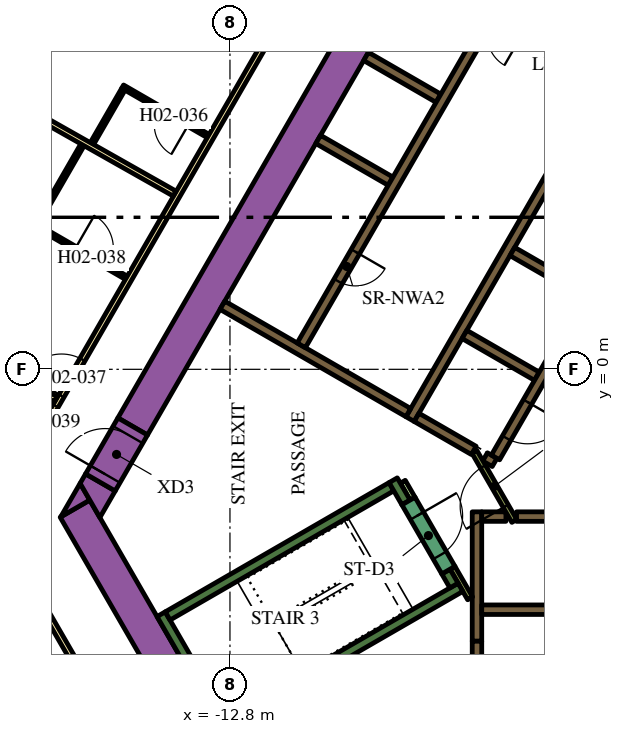
"""IFC4 building model, lengths in metres.
Left out: names, types, materials, properties, quantities, classifications, styles, units other than length and angle.
Written with IfcOpenShell. Run it as: python <this file> out.ifc"""

import sys

from ifc_helpers import new_model, si_unit, direction, frame, frame_2d, origin, place, context, subcontext, project, spatial, polyline, rectangle, outline, extrude, element, fill, save


model = new_model("IFC4")
c1 = context("Model", 3, precision=1e-05, world=origin(), true_north=direction((0.0, 1.0)))
c2 = subcontext(c1, "Body", "Model", "MODEL_VIEW")
j1 = project(units=[si_unit("LENGTHUNIT", "METRE"), si_unit("PLANEANGLEUNIT", "RADIAN")], contexts=[c1])
p1 = place(None, origin())
s1 = spatial("IfcSite", under=j1, at=p1, CompositionType="ELEMENT")
p2 = place(p1, origin())
s2 = spatial("IfcBuilding", under=s1, at=p2, CompositionType="ELEMENT")
p3 = place(p2, frame((0.0, 0.0, 47.1)))
s3 = spatial("IfcBuildingStorey", under=s2, at=p3, CompositionType="ELEMENT", Elevation=47.1)
p4 = place(p3, frame((-15.36, -1.503, 0.0), z_axis=(0.0, 0.0, 1.0), x_axis=(0.50000389221, 0.866023156604, 0.0)))
e1 = element("IfcWall", 1, at=p4, inside=s3, PredefinedType="SOLIDWALL", context=c2, shape_type="SweptSolid", body=[
    extrude(rectangle(XDim=21.0, YDim=0.9, at=frame_2d((10.5, 0.0))), origin(), (0.0, 0.0, 1.0), 3.9),
])
p5 = place(p3, frame((-12.134, -11.883, 0.0), z_axis=(0.0, 0.0, 1.0), x_axis=(-0.500005339912, 0.866022320763, 0.0)))
e2 = element("IfcWall", 2, at=p5, inside=s3, PredefinedType="SOLIDWALL", context=c2, shape_type="SweptSolid", body=[
    extrude(rectangle(XDim=9.488, YDim=0.9, at=frame_2d((4.744, 0.0))), origin(), (0.0, 0.0, 1.0), 3.9),
])
p6 = place(p3, origin())
e3 = element("IfcWall", 3, at=p6, inside=s3, PredefinedType="SOLIDWALL", context=c2, shape_type="SweptSolid", body=[
    extrude(outline(polyline([(-16.489, -3.44), (-17.251, -3.88), (-16.743, -3.0), (-16.489, -3.44)])), origin(), (0.0, 0.0, 1.0), 3.9),
])
e4 = element("IfcWall", 4, at=p6, inside=s3, PredefinedType="SOLIDWALL", context=c2, shape_type="SweptSolid", body=[
    extrude(outline(polyline([(-15.82, -3.201), (-16.223, -3.9), (-16.743, -3.0), (-16.599, -2.751), (-15.82, -3.201)])), origin(), (0.0, 0.0, 1.0), 3.9),
])
p7 = place(p3, frame((-12.885, -9.431, 0.0), z_axis=(0.0, 0.0, 1.0), x_axis=(-0.500020560727, 0.866013532718, 0.0)))
e5 = element("IfcWall", 5, at=p7, inside=s3, PredefinedType="SOLIDWALL", context=c2, shape_type="SweptSolid", body=[
    extrude(rectangle(XDim=3.45, YDim=0.25, at=frame_2d((1.725, 0.0))), origin(), (0.0, 0.0, 1.0), 3.9),
])
p8 = place(p3, frame((-14.44, -6.49, 0.0), z_axis=(0.0, 0.0, 1.0), x_axis=(0.866022966069, 0.500004222222, 0.0)))
e6 = element("IfcWall", 6, at=p8, inside=s3, PredefinedType="SOLIDWALL", context=c2, shape_type="SweptSolid", body=[
    extrude(rectangle(XDim=6.8, YDim=0.25, at=frame_2d((3.4, 0.0))), origin(), (0.0, 0.0, 1.0), 3.9),
])
p9 = place(p3, frame((-8.168, -3.503, 0.0), z_axis=(0.0, 0.0, 1.0), x_axis=(-0.499952099219, 0.866053057547, 0.0)))
e7 = element("IfcWall", 7, at=p9, inside=s3, PredefinedType="SOLIDWALL", context=c2, shape_type="SweptSolid", body=[
    extrude(rectangle(XDim=0.675, YDim=0.25, at=frame_2d((0.337, 0.0))), origin(), (0.0, 0.0, 1.0), 3.9),
])
p10 = place(p3, frame((-12.84, -9.261, 0.0), z_axis=(0.0, 0.0, 1.0), x_axis=(0.866016039709, 0.500016218704, 0.0)))
e8 = element("IfcWall", 8, at=p10, inside=s3, PredefinedType="SOLIDWALL", context=c2, shape_type="SweptSolid", body=[
    extrude(rectangle(XDim=7.05, YDim=0.25, at=frame_2d((3.525, 0.0))), origin(), (0.0, 0.0, 1.0), 3.9),
])
p11 = place(p3, frame((-6.905, -5.69, 0.0), z_axis=(0.0, 0.0, 1.0), x_axis=(-0.500402024738, 0.865793170242, 0.0)))
e9 = element("IfcWall", 9, at=p11, inside=s3, PredefinedType="SOLIDWALL", context=c2, shape_type="SweptSolid", body=[
    extrude(rectangle(XDim=0.425, YDim=0.25, at=frame_2d((0.212, 0.0))), origin(), (0.0, 0.0, 1.0), 3.9),
])
p12 = place(p3, frame((-5.259, -3.875, 0.0), z_axis=(0.0, 0.0, 1.0), x_axis=(1.0, 0.0, 0.0)))
e10 = element("IfcWall", 10, at=p12, inside=s3, PredefinedType="SOLIDWALL", context=c2, shape_type="SweptSolid", body=[
    extrude(rectangle(XDim=10.489, YDim=0.25, at=frame_2d((5.244, 0.0))), origin(), (0.0, 0.0, 1.0), 3.9),
])
p13 = place(p3, frame((-6.3, -3.75, 0.0), z_axis=(0.0, 0.0, 1.0), x_axis=(0.0, -1.0, 0.0)))
e11 = element("IfcWall", 11, at=p13, inside=s3, PredefinedType="SOLIDWALL", context=c2, shape_type="SweptSolid", body=[
    extrude(rectangle(XDim=3.404, YDim=0.25, at=frame_2d((1.702, 0.0))), origin(), (0.0, 0.0, 1.0), 3.9),
])
p14 = place(p3, frame((-6.175, -3.875, 0.0), z_axis=(0.0, 0.0, 1.0), x_axis=(1.0, 0.0, 0.0)))
e12 = element("IfcWall", 12, at=p14, inside=s3, PredefinedType="SOLIDWALL", context=c2, shape_type="SweptSolid", body=[
    extrude(rectangle(XDim=0.637, YDim=0.25, at=frame_2d((0.318, 0.0))), origin(), (0.0, 0.0, 1.0), 3.9),
])
p15 = place(p3, frame((-8.06, -1.311, 0.0), z_axis=(0.0, 0.0, 1.0), x_axis=(0.50000273126, 0.866023826885, 0.0)))
e13 = element("IfcWall", 13, at=p15, inside=s3, PredefinedType="SOLIDWALL", context=c2, shape_type="SweptSolid", body=[
    extrude(rectangle(XDim=10.33, YDim=0.25, at=frame_2d((5.165, 0.0))), origin(), (0.0, 0.0, 1.0), 3.9),
])
for number, where, z_axis, x_axis in (
    (14, (-5.369, 3.1, 0.0), (0.0, 0.0, 1.0), (0.866, -0.5, 0.0)),
    (15, (-4.724, -0.182, 0.0), (0.0, 0.0, 1.0), (-0.866, 0.5, 0.0)),
):
    element("IfcWall", number, at=place(p3, frame(where, z_axis=z_axis, x_axis=x_axis)), inside=s3, PredefinedType="SOLIDWALL", context=c2, shape_type="SweptSolid", body=[
        extrude(rectangle(XDim=2.2, YDim=0.25, at=frame_2d((1.1, 0.0))), origin(), (0.0, 0.0, 1.0), 3.9),
    ])
p16 = place(p3, frame((-6.088, -2.305, 0.0), z_axis=(0.0, 0.0, 1.0), x_axis=(0.866059450854, -0.499941024108, 0.0)))
e16 = element("IfcWall", 16, at=p16, inside=s3, PredefinedType="SOLIDWALL", context=c2, shape_type="SweptSolid", body=[
    extrude(rectangle(XDim=0.29, YDim=0.25, at=frame_2d((0.145, 0.0))), origin(), (0.0, 0.0, 1.0), 3.9),
])
p17 = place(p3, frame((-7.889, -1.265, 0.0), z_axis=(0.0, 0.0, 1.0), x_axis=(0.865986741702, -0.500066958712, 0.0)))
e17 = element("IfcWall", 17, at=p17, inside=s3, PredefinedType="SOLIDWALL", context=c2, shape_type="SweptSolid", body=[
    extrude(rectangle(XDim=1.738, YDim=0.25, at=frame_2d((0.869, 0.0))), origin(), (0.0, 0.0, 1.0), 3.9),
])
p18 = place(p3, frame((-8.106, -1.14, 0.0), z_axis=(0.0, 0.0, 1.0), x_axis=(-0.866000643155, 0.500042884217, 0.0)))
e18 = element("IfcWall", 18, at=p18, inside=s3, PredefinedType="SOLIDWALL", context=c2, shape_type="SweptSolid", body=[
    extrude(rectangle(XDim=5.65, YDim=0.25, at=frame_2d((2.825, 0.0))), origin(), (0.0, 0.0, 1.0), 3.9),
])
for number, where, z_axis, x_axis in (
    (19, (-8.574, 4.95, 0.0), (0.0, 0.0, 1.0), (-0.866, 0.5, 0.0)),
    (20, (-7.314, 7.132, 0.0), (0.0, 0.0, 1.0), (-0.866, 0.5, 0.0)),
):
    element("IfcWall", number, at=place(p3, frame(where, z_axis=z_axis, x_axis=x_axis)), inside=s3, PredefinedType="SOLIDWALL", context=c2, shape_type="SweptSolid", body=[
        extrude(rectangle(XDim=2.2, YDim=0.25, at=frame_2d((1.1, 0.0))), origin(), (0.0, 0.0, 1.0), 3.9),
    ])
p19 = place(p3, frame((-4.409, 8.365, 0.0), z_axis=(0.0, 0.0, 1.0), x_axis=(-0.866057014183, 0.499945245186, 0.0)))
e21 = element("IfcWall", 21, at=p19, inside=s3, PredefinedType="SOLIDWALL", context=c2, shape_type="SweptSolid", body=[
    extrude(rectangle(XDim=0.379, YDim=0.25, at=frame_2d((0.19, 0.0))), origin(), (0.0, 0.0, 1.0), 3.9),
])
p20 = place(p3, frame((-6.48, -6.027, 0.0), z_axis=(0.0, 0.0, 1.0), x_axis=(-0.499927229454, 0.866067413802, 0.0)))
e22 = element("IfcWall", 22, at=p20, inside=s3, PredefinedType="PARTITIONING", context=c2, shape_type="SweptSolid", body=[
    extrude(rectangle(XDim=0.929, YDim=0.15, at=frame_2d((0.464, 0.0))), origin(), (0.0, 0.0, 1.0), 3.9),
])
p21 = place(p3, frame((-8.252, -2.958, 0.0), z_axis=(0.0, 0.0, 1.0), x_axis=(0.500174715838, -0.865924508047, 0.0)))
e23 = element("IfcWall", 23, at=p21, inside=s3, PredefinedType="PARTITIONING", context=c2, shape_type="SweptSolid", body=[
    extrude(rectangle(XDim=0.514, YDim=0.15, at=frame_2d((0.257, 0.0))), origin(), (0.0, 0.0, 1.0), 2.75),
])
p22 = place(p3, frame((-6.175, -6.325, 0.0), z_axis=(0.0, 0.0, 1.0), x_axis=(1.0, 0.0, 0.0)))
e24 = element("IfcWall", 24, at=p22, inside=s3, PredefinedType="SOLIDWALL", context=c2, shape_type="SweptSolid", body=[
    extrude(rectangle(XDim=12.35, YDim=0.25, at=frame_2d((6.175, 0.0))), origin(), (0.0, 0.0, 1.0), 3.9),
])
p23 = place(p22, frame((3.205, 0.0, 0.0)))
e25 = element("IfcOpeningElement", 25, at=p23, cuts=e24, PredefinedType="OPENING", context=c2, shape_type="SweptSolid", body=[
    extrude(rectangle(XDim=0.9, YDim=2.1, at=frame_2d((0.45, 1.05))), frame((0.0, 0.135, 0.0), z_axis=(0.0, -1.0, 0.0), x_axis=(1.0, 0.0, 0.0)), (0.0, 0.0, 1.0), 0.27),
])
p24 = place(p22, frame((8.145, 0.0, 0.0)))
e26 = element("IfcOpeningElement", 26, at=p24, cuts=e24, PredefinedType="OPENING", context=c2, shape_type="SweptSolid", body=[
    extrude(rectangle(XDim=1.1, YDim=2.1, at=frame_2d((0.55, 1.05))), frame((0.0, 0.135, 0.0), z_axis=(0.0, -1.0, 0.0), x_axis=(1.0, 0.0, 0.0)), (0.0, 0.0, 1.0), 0.27),
])
p25 = place(p22, frame((10.665, 0.0, 0.0)))
e27 = element("IfcOpeningElement", 27, at=p25, cuts=e24, PredefinedType="OPENING", context=c2, shape_type="SweptSolid", body=[
    extrude(rectangle(XDim=1.1, YDim=2.1, at=frame_2d((0.55, 1.05))), frame((0.0, 0.135, 0.0), z_axis=(0.0, -1.0, 0.0), x_axis=(1.0, 0.0, 0.0)), (0.0, 0.0, 1.0), 0.27),
])
p26 = place(p3, frame((-6.008, 9.144, 0.0), z_axis=(0.0, 0.0, 1.0), x_axis=(-0.500006956611, -0.866021387346, 0.0)))
e28 = element("IfcWall", 28, at=p26, inside=s3, PredefinedType="SOLIDWALL", context=c2, shape_type="SweptSolid", body=[
    extrude(rectangle(XDim=9.83, YDim=0.25, at=frame_2d((4.915, 0.0))), origin(), (0.0, 0.0, 1.0), 3.9),
])
p27 = place(p26, frame((6.985, 0.0, 0.0)))
e29 = element("IfcOpeningElement", 29, at=p27, cuts=e28, PredefinedType="OPENING", context=c2, shape_type="SweptSolid", body=[
    extrude(rectangle(XDim=0.9, YDim=2.1, at=frame_2d((0.45, 1.05))), frame((0.0, 0.135, 0.0), z_axis=(0.0, -1.0, 0.0), x_axis=(1.0, 0.0, 0.0)), (0.0, 0.0, 1.0), 0.27),
])
p28 = place(p3, frame((-0.898, 6.194, 0.0), z_axis=(0.0, 0.0, 1.0), x_axis=(-0.499996202215, -0.866027596426, 0.0)))
e30 = element("IfcWall", 30, at=p28, inside=s3, PredefinedType="SOLIDWALL", context=c2, shape_type="SweptSolid", body=[
    extrude(rectangle(XDim=9.83, YDim=0.25, at=frame_2d((4.915, 0.0))), origin(), (0.0, 0.0, 1.0), 3.9),
])
p29 = place(p28, frame((0.585, 0.0, 0.0)))
e31 = element("IfcOpeningElement", 31, at=p29, cuts=e30, PredefinedType="OPENING", context=c2, shape_type="SweptSolid", body=[
    extrude(rectangle(XDim=1.1, YDim=2.1, at=frame_2d((0.55, 1.05))), frame((0.0, 0.135, 0.0), z_axis=(0.0, -1.0, 0.0), x_axis=(1.0, 0.0, 0.0)), (0.0, 0.0, 1.0), 0.27),
])
p30 = place(p28, frame((3.105, 0.0, 0.0)))
e32 = element("IfcOpeningElement", 32, at=p30, cuts=e30, PredefinedType="OPENING", context=c2, shape_type="SweptSolid", body=[
    extrude(rectangle(XDim=1.1, YDim=2.1, at=frame_2d((0.55, 1.05))), frame((0.0, 0.135, 0.0), z_axis=(0.0, -1.0, 0.0), x_axis=(1.0, 0.0, 0.0)), (0.0, 0.0, 1.0), 0.27),
])
p31 = place(p28, frame((5.625, 0.0, 0.0)))
e33 = element("IfcOpeningElement", 33, at=p31, cuts=e30, PredefinedType="OPENING", context=c2, shape_type="SweptSolid", body=[
    extrude(rectangle(XDim=1.1, YDim=2.1, at=frame_2d((0.55, 1.05))), frame((0.0, 0.135, 0.0), z_axis=(0.0, -1.0, 0.0), x_axis=(1.0, 0.0, 0.0)), (0.0, 0.0, 1.0), 0.27),
])
p32 = place(p28, frame((8.145, 0.0, 0.0)))
e34 = element("IfcOpeningElement", 34, at=p32, cuts=e30, PredefinedType="OPENING", context=c2, shape_type="SweptSolid", body=[
    extrude(rectangle(XDim=1.1, YDim=2.1, at=frame_2d((0.55, 1.05))), frame((0.0, 0.135, 0.0), z_axis=(0.0, -1.0, 0.0), x_axis=(1.0, 0.0, 0.0)), (0.0, 0.0, 1.0), 0.27),
])
p33 = place(p3, frame((-8.103, -3.466, 0.0), z_axis=(0.0, 0.0, 1.0), x_axis=(0.500078061341, -0.865980330357, 0.0)))
e35 = element("IfcWall", 35, at=p33, inside=s3, PredefinedType="SOLIDWALL", context=c2, shape_type="SweptSolid", body=[
    extrude(rectangle(XDim=2.1, YDim=0.4, at=frame_2d((1.05, 0.0))), origin(), (0.0, 0.0, 1.0), 3.9),
])
p34 = place(p33, frame((0.45, 0.0, 0.0)))
e36 = element("IfcOpeningElement", 36, at=p34, cuts=e35, PredefinedType="OPENING", context=c2, shape_type="SweptSolid", body=[
    extrude(rectangle(XDim=1.2, YDim=2.1, at=frame_2d((0.6, 1.05))), frame((0.0, 0.21, 0.0), z_axis=(0.0, -1.0, 0.0), x_axis=(1.0, 0.0, 0.0)), (0.0, 0.0, 1.0), 0.42),
])
p35 = place(p3, frame((-6.3, -7.154, 0.0), z_axis=(0.0, 0.0, 1.0), x_axis=(0.0, -1.0, 0.0)))
e37 = element("IfcWall", 37, at=p35, inside=s3, PredefinedType="SOLIDWALL", context=c2, shape_type="SweptSolid", body=[
    extrude(rectangle(XDim=1.8, YDim=0.25, at=frame_2d((0.9, 0.0))), origin(), (0.0, 0.0, 1.0), 3.9),
])
p36 = place(p35, frame((0.45, 0.0, 0.0)))
e38 = element("IfcOpeningElement", 38, at=p36, cuts=e37, PredefinedType="OPENING", context=c2, shape_type="SweptSolid", body=[
    extrude(rectangle(XDim=0.9, YDim=2.1, at=frame_2d((0.45, 1.05))), frame((0.0, 0.135, 0.0), z_axis=(0.0, -1.0, 0.0), x_axis=(1.0, 0.0, 0.0)), (0.0, 0.0, 1.0), 0.27),
])
p37 = place(p3, frame((-5.317, -3.99, 0.0), z_axis=(0.0, 0.0, 1.0), x_axis=(-0.500027713859, 0.866009402589, 0.0)))
e39 = element("IfcWall", 39, at=p37, inside=s3, PredefinedType="PARTITIONING", context=c2, shape_type="SweptSolid", body=[
    extrude(rectangle(XDim=2.1, YDim=0.15, at=frame_2d((1.05, 0.0))), origin(), (0.0, 0.0, 1.0), 3.9),
])
p38 = place(p37, frame((0.45, 0.0, 0.0)))
e40 = element("IfcOpeningElement", 40, at=p38, cuts=e39, PredefinedType="OPENING", context=c2, shape_type="SweptSolid", body=[
    extrude(rectangle(XDim=1.2, YDim=2.1, at=frame_2d((0.6, 1.05))), frame((0.0, 0.085, 0.0), z_axis=(0.0, -1.0, 0.0), x_axis=(1.0, 0.0, 0.0)), (0.0, 0.0, 1.0), 0.17),
])
p39 = place(p3, frame((-16.209, -2.976, 0.0), z_axis=(0.0, 0.0, 1.0), x_axis=(0.499954529098, 0.86605165483, 0.0)))
e41 = element("IfcWall", 41, at=p39, inside=s3, PredefinedType="SOLIDWALL", context=c2, shape_type="SweptSolid", body=[
    extrude(rectangle(XDim=1.7, YDim=0.9, at=frame_2d((0.85, 0.0))), origin(), (0.0, 0.0, 1.0), 3.9),
])
p40 = place(p39, frame((0.25, 0.0, 0.0)))
e42 = element("IfcOpeningElement", 42, at=p40, cuts=e41, PredefinedType="OPENING", context=c2, shape_type="SweptSolid", body=[
    extrude(rectangle(XDim=1.2, YDim=2.1, at=frame_2d((0.6, 1.05))), frame((0.0, 0.46, 0.0), z_axis=(0.0, -1.0, 0.0), x_axis=(1.0, 0.0, 0.0)), (0.0, 0.0, 1.0), 0.92),
])
p41 = place(p3, frame((-19.081, -3.9, 0.0), z_axis=(0.0, 0.0, 1.0), x_axis=(0.499998313975, 0.866026377209, 0.0)))
e43 = element("IfcWall", 43, at=p41, inside=s3, PredefinedType="PARTITIONING", context=c2, shape_type="SweptSolid", body=[
    extrude(rectangle(XDim=25.766, YDim=0.15, at=frame_2d((12.883, 0.0))), origin(), (0.0, 0.0, 1.0), 2.75),
])
p42 = place(p41, frame((16.196, 0.0, 0.0)))
e44 = element("IfcOpeningElement", 44, at=p42, cuts=e43, PredefinedType="OPENING", context=c2, shape_type="SweptSolid", body=[
    extrude(rectangle(XDim=1.0, YDim=2.1, at=frame_2d((0.5, 1.05))), frame((0.0, 0.085, 0.0), z_axis=(0.0, -1.0, 0.0), x_axis=(1.0, 0.0, 0.0)), (0.0, 0.0, 1.0), 0.17),
])
p43 = place(p41, frame((14.889, 0.0, 0.0)))
e45 = element("IfcOpeningElement", 45, at=p43, cuts=e43, PredefinedType="OPENING", context=c2, shape_type="SweptSolid", body=[
    extrude(rectangle(XDim=1.0, YDim=2.1, at=frame_2d((0.5, 1.05))), frame((0.0, 0.085, 0.0), z_axis=(0.0, -1.0, 0.0), x_axis=(1.0, 0.0, 0.0)), (0.0, 0.0, 1.0), 0.17),
])
p44 = place(p41, frame((3.698, 0.0, 0.0)))
e46 = element("IfcOpeningElement", 46, at=p44, cuts=e43, PredefinedType="OPENING", context=c2, shape_type="SweptSolid", body=[
    extrude(rectangle(XDim=1.1, YDim=2.1, at=frame_2d((0.55, 1.05))), frame((0.0, 0.085, 0.0), z_axis=(0.0, -1.0, 0.0), x_axis=(1.0, 0.0, 0.0)), (0.0, 0.0, 1.0), 0.17),
])
p45 = place(p41, frame((2.392, 0.0, 0.0)))
e47 = element("IfcOpeningElement", 47, at=p45, cuts=e43, PredefinedType="OPENING", context=c2, shape_type="SweptSolid", body=[
    extrude(rectangle(XDim=1.0, YDim=2.1, at=frame_2d((0.5, 1.05))), frame((0.0, 0.085, 0.0), z_axis=(0.0, -1.0, 0.0), x_axis=(1.0, 0.0, 0.0)), (0.0, 0.0, 1.0), 0.17),
])
p46 = place(p3, frame((-16.412, -8.523, 0.0), z_axis=(0.0, 0.0, 1.0), x_axis=(-0.500001929737, 0.866024289647, 0.0)))
e48 = element("IfcWall", 48, at=p46, inside=s3, PredefinedType="PARTITIONING", context=c2, shape_type="SweptSolid", body=[
    extrude(rectangle(XDim=5.268, YDim=0.15, at=frame_2d((2.634, 0.0))), origin(), (0.0, 0.0, 1.0), 2.75),
])
p47 = place(p3, frame((-24.145, 2.871, 0.0), z_axis=(0.0, 0.0, 1.0), x_axis=(0.879551725039, -0.475803281809, 0.0)))
e49 = element("IfcWall", 49, at=p47, inside=s3, PredefinedType="PARTITIONING", context=c2, shape_type="SweptSolid", body=[
    extrude(rectangle(XDim=7.688, YDim=0.15, at=frame_2d((3.844, 0.0))), origin(), (0.0, 0.0, 1.0), 2.75),
])
p48 = place(p3, frame((-27.134, -2.779, 0.0), z_axis=(0.0, 0.0, 1.0), x_axis=(0.8882049501, -0.459447457951, 0.0)))
e50 = element("IfcWall", 50, at=p48, inside=s3, PredefinedType="PARTITIONING", context=c2, shape_type="SweptSolid", body=[
    extrude(rectangle(XDim=11.638, YDim=0.15, at=frame_2d((5.819, 0.0))), origin(), (0.0, 0.0, 1.0), 2.75),
])
p49 = place(p3, frame((-21.052, 8.464, 0.0), z_axis=(0.0, 0.0, 1.0), x_axis=(0.87059371954, -0.492002617368, 0.0)))
e51 = element("IfcWall", 51, at=p49, inside=s3, PredefinedType="PARTITIONING", context=c2, shape_type="SweptSolid", body=[
    extrude(rectangle(XDim=7.803, YDim=0.15, at=frame_2d((3.902, 0.0))), origin(), (0.0, 0.0, 1.0), 2.75),
])
p50 = place(p3, frame((-13.373, 6.138, 0.0), z_axis=(0.0, 0.0, 1.0), x_axis=(-0.866062058628, 0.499936506574, 0.0)))
e52 = element("IfcWall", 52, at=p50, inside=s3, PredefinedType="PARTITIONING", context=c2, shape_type="SweptSolid", body=[
    extrude(rectangle(XDim=2.6, YDim=0.1, at=frame_2d((1.3, 0.0))), origin(), (0.0, 0.0, 1.0), 2.75),
])
p51 = place(p50, frame((0.6, 0.0, 0.0)))
e53 = element("IfcOpeningElement", 53, at=p51, cuts=e52, PredefinedType="OPENING", context=c2, shape_type="SweptSolid", body=[
    extrude(rectangle(XDim=0.9, YDim=2.1, at=frame_2d((0.45, 1.05))), frame((0.0, 0.06, 0.0), z_axis=(0.0, -1.0, 0.0), x_axis=(1.0, 0.0, 0.0)), (0.0, 0.0, 1.0), 0.12),
])
p52 = place(p3, frame((-15.606, 7.37, 0.0), z_axis=(0.0, 0.0, 1.0), x_axis=(-0.499974350878, -0.866040211805, 0.0)))
e54 = element("IfcWall", 54, at=p52, inside=s3, PredefinedType="PARTITIONING", context=c2, shape_type="SweptSolid", body=[
    extrude(rectangle(XDim=1.65, YDim=0.1, at=frame_2d((0.825, 0.0))), origin(), (0.0, 0.0, 1.0), 2.75),
])
p53 = place(p3, frame((-17.951, 3.808, 0.0), z_axis=(0.0, 0.0, 1.0), x_axis=(0.866034573852, -0.49998411664, 0.0)))
e55 = element("IfcWall", 55, at=p53, inside=s3, PredefinedType="PARTITIONING", context=c2, shape_type="SweptSolid", body=[
    extrude(rectangle(XDim=2.8, YDim=0.1, at=frame_2d((1.4, 0.0))), origin(), (0.0, 0.0, 1.0), 2.75),
])
p54 = place(p53, frame((1.25, 0.0, 0.0)))
e56 = element("IfcOpeningElement", 56, at=p54, cuts=e55, PredefinedType="OPENING", context=c2, shape_type="SweptSolid", body=[
    extrude(rectangle(XDim=1.0, YDim=2.1, at=frame_2d((0.5, 1.05))), frame((0.0, 0.06, 0.0), z_axis=(0.0, -1.0, 0.0), x_axis=(1.0, 0.0, 0.0)), (0.0, 0.0, 1.0), 0.12),
])
p55 = place(p3, frame((-17.878, 3.835, 0.0), z_axis=(0.0, 0.0, 1.0), x_axis=(0.500061428766, 0.865989934965, 0.0)))
e57 = element("IfcWall", 57, at=p55, inside=s3, PredefinedType="PARTITIONING", context=c2, shape_type="SweptSolid", body=[
    extrude(rectangle(XDim=2.39, YDim=0.1, at=frame_2d((1.195, 0.0))), origin(), (0.0, 0.0, 1.0), 2.75),
])
p56 = place(p27, origin())
e58 = element("IfcDoor", 58, at=p56, inside=s3, OperationType="SINGLE_SWING_LEFT", PredefinedType="DOOR", context=c2, shape_type="SweptSolid", body=[
    extrude(rectangle(XDim=0.9, YDim=2.1, at=frame_2d((0.45, 1.05))), frame((0.0, 0.025, 0.0), z_axis=(0.0, -1.0, 0.0), x_axis=(1.0, 0.0, 0.0)), (0.0, 0.0, 1.0), 0.05),
])
fill(e29, e58)
p57 = place(p32, origin())
e59 = element("IfcDoor", 59, at=p57, inside=s3, OperationType="DOUBLE_DOOR_SLIDING", PredefinedType="DOOR", context=c2, shape_type="SweptSolid", body=[
    extrude(rectangle(XDim=1.1, YDim=2.1, at=frame_2d((0.55, 1.05))), frame((0.0, 0.025, 0.0), z_axis=(0.0, -1.0, 0.0), x_axis=(1.0, 0.0, 0.0)), (0.0, 0.0, 1.0), 0.05),
])
fill(e34, e59)
p58 = place(p34, origin())
e60 = element("IfcDoor", 60, at=p58, inside=s3, OperationType="SINGLE_SWING_LEFT", PredefinedType="DOOR", context=c2, shape_type="SweptSolid", body=[
    extrude(rectangle(XDim=1.2, YDim=2.1, at=frame_2d((0.6, 1.05))), frame((0.0, 0.025, 0.0), z_axis=(0.0, -1.0, 0.0), x_axis=(1.0, 0.0, 0.0)), (0.0, 0.0, 1.0), 0.05),
])
fill(e36, e60)
p59 = place(p38, origin())
e61 = element("IfcDoor", 61, at=p59, inside=s3, OperationType="SINGLE_SWING_LEFT", PredefinedType="DOOR", context=c2, shape_type="SweptSolid", body=[
    extrude(rectangle(XDim=1.2, YDim=2.1, at=frame_2d((0.6, 1.05))), frame((0.0, 0.025, 0.0), z_axis=(0.0, -1.0, 0.0), x_axis=(1.0, 0.0, 0.0)), (0.0, 0.0, 1.0), 0.05),
])
fill(e40, e61)
p60 = place(p40, origin())
e62 = element("IfcDoor", 62, at=p60, inside=s3, OperationType="SINGLE_SWING_LEFT", PredefinedType="DOOR", context=c2, shape_type="SweptSolid", body=[
    extrude(rectangle(XDim=1.2, YDim=2.1, at=frame_2d((0.6, 1.05))), frame((0.0, 0.025, 0.0), z_axis=(0.0, -1.0, 0.0), x_axis=(1.0, 0.0, 0.0)), (0.0, 0.0, 1.0), 0.05),
])
fill(e42, e62)
p61 = place(p51, origin())
e63 = element("IfcDoor", 63, at=p61, inside=s3, OperationType="SINGLE_SWING_LEFT", PredefinedType="DOOR", context=c2, shape_type="SweptSolid", body=[
    extrude(rectangle(XDim=0.9, YDim=2.1, at=frame_2d((0.45, 1.05))), frame((0.0, 0.025, 0.0), z_axis=(0.0, -1.0, 0.0), x_axis=(1.0, 0.0, 0.0)), (0.0, 0.0, 1.0), 0.05),
])
fill(e53, e63)
p62 = place(p44, origin())
e64 = element("IfcDoor", 64, at=p62, inside=s3, OperationType="SINGLE_SWING_LEFT", PredefinedType="DOOR", context=c2, shape_type="SweptSolid", body=[
    extrude(rectangle(XDim=1.1, YDim=2.1, at=frame_2d((0.55, 1.05))), frame((0.0, 0.025, 0.0), z_axis=(0.0, -1.0, 0.0), x_axis=(1.0, 0.0, 0.0)), (0.0, 0.0, 1.0), 0.05),
])
fill(e46, e64)
p63 = place(p54, origin())
e65 = element("IfcDoor", 65, at=p63, inside=s3, OperationType="SINGLE_SWING_LEFT", PredefinedType="DOOR", context=c2, shape_type="SweptSolid", body=[
    extrude(rectangle(XDim=1.0, YDim=2.1, at=frame_2d((0.5, 1.05))), frame((0.0, 0.025, 0.0), z_axis=(0.0, -1.0, 0.0), x_axis=(1.0, 0.0, 0.0)), (0.0, 0.0, 1.0), 0.05),
])
fill(e56, e65)
p64 = place(p45, origin())
e66 = element("IfcDoor", 66, at=p64, inside=s3, OperationType="SINGLE_SWING_RIGHT", PredefinedType="DOOR", context=c2, shape_type="SweptSolid", body=[
    extrude(rectangle(XDim=1.0, YDim=2.1, at=frame_2d((0.5, 1.05))), frame((0.0, 0.025, 0.0), z_axis=(0.0, -1.0, 0.0), x_axis=(1.0, 0.0, 0.0)), (0.0, 0.0, 1.0), 0.05),
])
fill(e47, e66)
save(model, sys.argv[1])
